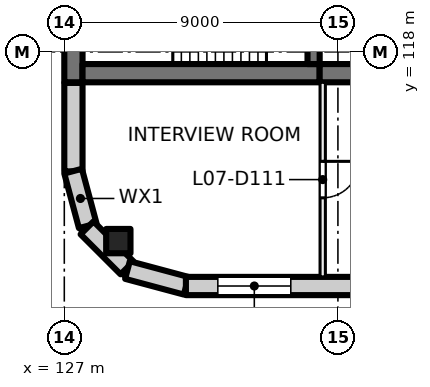
"""IFC4 building model, lengths in metres.
Left out: names, types, materials, properties, quantities, classifications, styles, units other than length and angle.
Written with IfcOpenShell. Run it as: python <this file> out.ifc"""

import sys

from ifc_helpers import new_model, si_unit, direction, frame, frame_2d, origin, origin_2d, place, context, subcontext, project, spatial, rectangle, extrude, element, fill, save


model = new_model("IFC4")
c1 = context("Model", 3, precision=1e-05, world=origin(), true_north=direction((0.0, 1.0)))
c2 = subcontext(c1, "Body", "Model", "MODEL_VIEW")
j1 = project(units=[si_unit("LENGTHUNIT", "METRE"), si_unit("PLANEANGLEUNIT", "RADIAN")], contexts=[c1])
p1 = place(None, origin())
s1 = spatial("IfcSite", under=j1, at=p1, CompositionType="ELEMENT")
p2 = place(p1, origin())
s2 = spatial("IfcBuilding", under=s1, at=p2, CompositionType="ELEMENT")
p3 = place(p2, frame((0.0, 0.0, 35.5)))
s3 = spatial("IfcBuildingStorey", under=s2, at=p3, CompositionType="ELEMENT", Elevation=35.5)
p4 = place(p3, frame((128.777, 111.777, 0.0), z_axis=(0.0, 0.0, 1.0), x_axis=(1.0, 0.0, 0.0)))
e1 = element("IfcColumn", 1, at=p4, inside=s3, PredefinedType="COLUMN", context=c2, shape_type="SweptSolid", body=[
    extrude(rectangle(XDim=0.8, YDim=0.8, at=origin_2d()), origin(), (0.0, 0.0, 1.0), 4.0),
])
p5 = place(p3, frame((127.3, 117.0, 0.0), z_axis=(0.0, 0.0, 1.0), x_axis=(0.0, 1.0, 0.0)))
e2 = element("IfcWall", 2, at=p5, inside=s3, PredefinedType="SHEAR", context=c2, shape_type="SweptSolid", body=[
    extrude(rectangle(XDim=3.8, YDim=0.6, at=frame_2d((1.9, 0.0))), origin(), (0.0, 0.0, 1.0), 4.0),
])
p6 = place(p3, frame((127.6, 117.3, 0.0), z_axis=(0.0, 0.0, 1.0), x_axis=(1.0, 0.0, 0.0)))
e3 = element("IfcWall", 3, at=p6, inside=s3, PredefinedType="SHEAR", context=c2, shape_type="SweptSolid", body=[
    extrude(rectangle(XDim=7.8, YDim=0.6, at=frame_2d((3.9, 0.0))), origin(), (0.0, 0.0, 1.0), 4.0),
])
p7 = place(p3, frame((135.4, 117.3, 0.0), z_axis=(0.0, 0.0, 1.0), x_axis=(1.0, 0.0, 0.0)))
e4 = element("IfcWall", 4, at=p7, inside=s3, PredefinedType="SHEAR", context=c2, shape_type="SweptSolid", body=[
    extrude(rectangle(XDim=4.6, YDim=0.6, at=frame_2d((2.3, 0.0))), origin(), (0.0, 0.0, 1.0), 4.0),
])
p8 = place(p3, frame((135.2, 117.6, 0.0), z_axis=(0.0, 0.0, 1.0), x_axis=(0.0, 1.0, 0.0)))
e5 = element("IfcWall", 5, at=p8, inside=s3, PredefinedType="SHEAR", context=c2, shape_type="SweptSolid", body=[
    extrude(rectangle(XDim=2.8, YDim=0.4, at=frame_2d((1.4, 0.0))), origin(), (0.0, 0.0, 1.0), 4.0),
])
p9 = place(p8, frame((0.9, 0.0, 0.0)))
e6 = element("IfcOpeningElement", 6, at=p9, cuts=e5, PredefinedType="OPENING", context=c2, shape_type="SweptSolid", body=[
    extrude(rectangle(XDim=1.0, YDim=2.1, at=frame_2d((0.5, 1.05))), frame((0.0, 0.21, 0.0), z_axis=(0.0, -1.0, 0.0), x_axis=(1.0, 0.0, 0.0)), (0.0, 0.0, 1.0), 0.42),
])
p10 = place(p3, frame((127.3, 114.07, 0.0), z_axis=(0.0, 0.0, 1.0), x_axis=(0.0, 1.0, 0.0)))
e7 = element("IfcWall", 7, at=p10, inside=s3, PredefinedType="SOLIDWALL", context=c2, shape_type="SweptSolid", body=[
    extrude(rectangle(XDim=2.91, YDim=0.6, at=frame_2d((1.455, 0.0))), origin(), (0.0, 0.0, 1.0), 3.625),
])
for number, where, z_axis, x_axis in (
    (8, (127.771, 112.281, 0.0), (0.0, 0.0, 1.0), (-0.259, 0.966, 0.0)),
    (9, (129.064, 110.896, 0.0), (0.0, 0.0, 1.0), (-0.707, 0.707, 0.0)),
):
    element("IfcWall", number, at=place(p3, frame(where, z_axis=z_axis, x_axis=x_axis)), inside=s3, PredefinedType="SOLIDWALL", context=c2, shape_type="SweptSolid", body=[
        extrude(rectangle(XDim=1.861, YDim=0.6, at=frame_2d((0.93, 0.0))), origin(), (0.0, 0.0, 1.0), 3.625),
    ])
p11 = place(p3, frame((131.01, 110.308, 0.0), z_axis=(0.0, 0.0, 1.0), x_axis=(-0.965920269068, 0.258839784042, 0.0)))
e10 = element("IfcWall", 10, at=p11, inside=s3, PredefinedType="SOLIDWALL", context=c2, shape_type="SweptSolid", body=[
    extrude(rectangle(XDim=2.0, YDim=0.6, at=frame_2d((1.0, 0.0))), origin(), (0.0, 0.0, 1.0), 3.625),
])
p12 = place(p3, frame((162.93, 110.3, 0.0), z_axis=(0.0, 0.0, 1.0), x_axis=(-1.0, 0.0, 0.0)))
e11 = element("IfcWall", 11, at=p12, inside=s3, PredefinedType="SOLIDWALL", context=c2, shape_type="SweptSolid", body=[
    extrude(rectangle(XDim=31.93, YDim=0.6, at=frame_2d((15.965, 0.0))), origin(), (0.0, 0.0, 1.0), 3.625),
])
p13 = place(p12, frame((1.48, 0.0, 0.9)))
e12 = element("IfcOpeningElement", 12, at=p13, cuts=e11, PredefinedType="OPENING", context=c2, shape_type="SweptSolid", body=[
    extrude(rectangle(XDim=2.4, YDim=2.4, at=frame_2d((1.2, 1.2))), frame((0.0, 0.31, 0.0), z_axis=(0.0, -1.0, 0.0), x_axis=(1.0, 0.0, 0.0)), (0.0, 0.0, 1.0), 0.62),
])
p14 = place(p12, frame((5.98, 0.0, 0.9)))
e13 = element("IfcOpeningElement", 13, at=p14, cuts=e11, PredefinedType="OPENING", context=c2, shape_type="SweptSolid", body=[
    extrude(rectangle(XDim=2.4, YDim=2.4, at=frame_2d((1.2, 1.2))), frame((0.0, 0.31, 0.0), z_axis=(0.0, -1.0, 0.0), x_axis=(1.0, 0.0, 0.0)), (0.0, 0.0, 1.0), 0.62),
])
p15 = place(p12, frame((10.48, 0.0, 0.9)))
e14 = element("IfcOpeningElement", 14, at=p15, cuts=e11, PredefinedType="OPENING", context=c2, shape_type="SweptSolid", body=[
    extrude(rectangle(XDim=2.4, YDim=2.4, at=frame_2d((1.2, 1.2))), frame((0.0, 0.31, 0.0), z_axis=(0.0, -1.0, 0.0), x_axis=(1.0, 0.0, 0.0)), (0.0, 0.0, 1.0), 0.62),
])
p16 = place(p12, frame((14.98, 0.0, 0.9)))
e15 = element("IfcOpeningElement", 15, at=p16, cuts=e11, PredefinedType="OPENING", context=c2, shape_type="SweptSolid", body=[
    extrude(rectangle(XDim=2.4, YDim=2.4, at=frame_2d((1.2, 1.2))), frame((0.0, 0.31, 0.0), z_axis=(0.0, -1.0, 0.0), x_axis=(1.0, 0.0, 0.0)), (0.0, 0.0, 1.0), 0.62),
])
p17 = place(p12, frame((19.48, 0.0, 0.9)))
e16 = element("IfcOpeningElement", 16, at=p17, cuts=e11, PredefinedType="OPENING", context=c2, shape_type="SweptSolid", body=[
    extrude(rectangle(XDim=2.4, YDim=2.4, at=frame_2d((1.2, 1.2))), frame((0.0, 0.31, 0.0), z_axis=(0.0, -1.0, 0.0), x_axis=(1.0, 0.0, 0.0)), (0.0, 0.0, 1.0), 0.62),
])
p18 = place(p12, frame((23.98, 0.0, 0.9)))
e17 = element("IfcOpeningElement", 17, at=p18, cuts=e11, PredefinedType="OPENING", context=c2, shape_type="SweptSolid", body=[
    extrude(rectangle(XDim=2.4, YDim=2.4, at=frame_2d((1.2, 1.2))), frame((0.0, 0.31, 0.0), z_axis=(0.0, -1.0, 0.0), x_axis=(1.0, 0.0, 0.0)), (0.0, 0.0, 1.0), 0.62),
])
p19 = place(p12, frame((28.48, 0.0, 0.9)))
e18 = element("IfcOpeningElement", 18, at=p19, cuts=e11, PredefinedType="OPENING", context=c2, shape_type="SweptSolid", body=[
    extrude(rectangle(XDim=2.4, YDim=2.4, at=frame_2d((1.2, 1.2))), frame((0.0, 0.31, 0.0), z_axis=(0.0, -1.0, 0.0), x_axis=(1.0, 0.0, 0.0)), (0.0, 0.0, 1.0), 0.62),
])
p20 = place(p3, frame((135.5, 117.0, 0.0), z_axis=(0.0, 0.0, 1.0), x_axis=(0.0, -1.0, 0.0)))
e19 = element("IfcWall", 19, at=p20, inside=s3, PredefinedType="PARTITIONING", context=c2, shape_type="SweptSolid", body=[
    extrude(rectangle(XDim=6.4, YDim=0.175, at=frame_2d((3.2, 0.0))), origin(), (0.0, 0.0, 1.0), 3.625),
])
p21 = place(p20, frame((2.6, 0.0, 0.0)))
e20 = element("IfcOpeningElement", 20, at=p21, cuts=e19, PredefinedType="OPENING", context=c2, shape_type="SweptSolid", body=[
    extrude(rectangle(XDim=1.2, YDim=2.1, at=frame_2d((0.6, 1.05))), frame((0.0, 0.097, 0.0), z_axis=(0.0, -1.0, 0.0), x_axis=(1.0, 0.0, 0.0)), (0.0, 0.0, 1.0), 0.195),
])
p22 = place(p19, origin())
e21 = element("IfcWindow", 21, at=p22, inside=s3, PartitioningType="SINGLE_PANEL", PredefinedType="WINDOW", context=c2, shape_type="SweptSolid", body=[
    extrude(rectangle(XDim=2.4, YDim=2.4, at=frame_2d((1.2, 1.2))), frame((0.0, 0.03, 0.0), z_axis=(0.0, -1.0, 0.0), x_axis=(1.0, 0.0, 0.0)), (0.0, 0.0, 1.0), 0.06),
])
fill(e18, e21)
p23 = place(p21, origin())
e22 = element("IfcDoor", 22, at=p23, inside=s3, OperationType="DOUBLE_DOOR_SINGLE_SWING", PredefinedType="DOOR", context=c2, shape_type="SweptSolid", body=[
    extrude(rectangle(XDim=1.2, YDim=2.1, at=frame_2d((0.6, 1.05))), frame((0.0, 0.025, 0.0), z_axis=(0.0, -1.0, 0.0), x_axis=(1.0, 0.0, 0.0)), (0.0, 0.0, 1.0), 0.05),
])
fill(e20, e22)
save(model, sys.argv[1])
